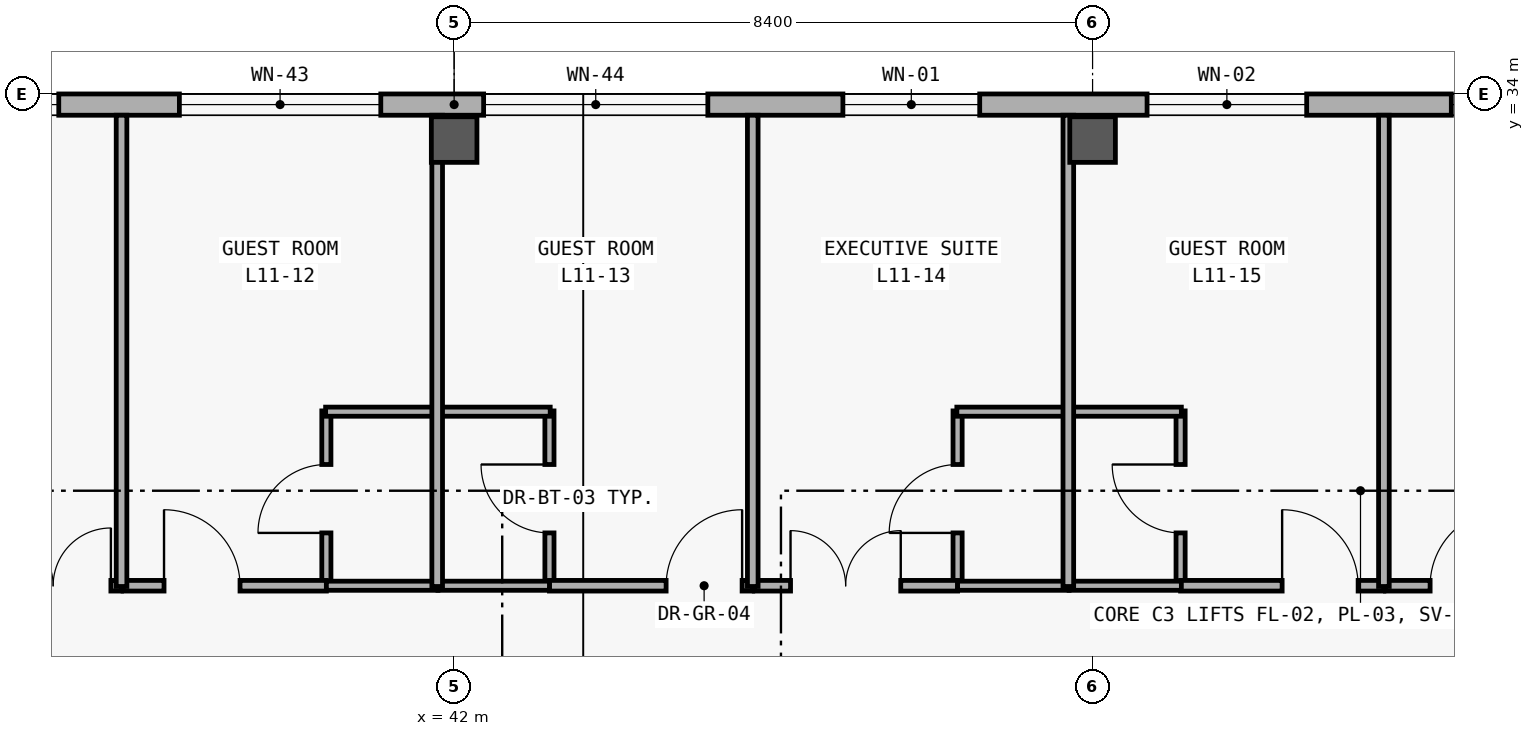
"""IFC4 building model, lengths in metres.
Left out: names, types, materials, properties, quantities, classifications, styles, units other than length and angle.
Written with IfcOpenShell. Run it as: python <this file> out.ifc"""

import sys

from ifc_helpers import new_model, si_unit, direction, frame, frame_2d, origin, origin_2d, place, context, subcontext, project, spatial, rectangle, extrude, element, fill, save


model = new_model("IFC4")
c1 = context("Model", 3, precision=1e-05, world=origin(), true_north=direction((0.0, 1.0)))
c2 = subcontext(c1, "Body", "Model", "MODEL_VIEW")
j1 = project(units=[si_unit("LENGTHUNIT", "METRE"), si_unit("PLANEANGLEUNIT", "RADIAN")], contexts=[c1])
p1 = place(None, origin())
s1 = spatial("IfcSite", under=j1, at=p1, CompositionType="ELEMENT")
p2 = place(p1, origin())
s2 = spatial("IfcBuilding", under=s1, at=p2, CompositionType="ELEMENT")
p3 = place(p2, frame((0.0, 0.0, 44.4)))
s3 = spatial("IfcBuildingStorey", under=s2, at=p3, CompositionType="ELEMENT", Elevation=44.4)
for number, where, z_axis, x_axis in (
    (1, (42.0, 33.4, 0.0), (0.0, 0.0, 1.0), (1.0, 0.0, 0.0)),
    (2, (50.4, 33.4, 0.0), (0.0, 0.0, 1.0), (1.0, 0.0, 0.0)),
):
    element("IfcColumn", number, at=place(p3, frame(where, z_axis=z_axis, x_axis=x_axis)), inside=s3, PredefinedType="COLUMN", context=c2, shape_type="SweptSolid", body=[
        extrude(rectangle(XDim=0.6, YDim=0.6, at=origin_2d()), origin(), (0.0, 0.0, 1.0), 4.2),
    ])
p4 = place(p3, frame((17.08, 33.86, 0.0), z_axis=(0.0, 0.0, 1.0), x_axis=(1.0, 0.0, 0.0)))
e3 = element("IfcWall", 3, at=p4, inside=s3, PredefinedType="SOLIDWALL", context=c2, shape_type="SweptSolid", body=[
    extrude(rectangle(XDim=49.84, YDim=0.28, at=frame_2d((24.92, 0.0))), origin(), (0.0, 0.0, 1.0), 3.96),
])
p5 = place(p4, frame((5.295, 0.0, 0.85)))
e4 = element("IfcOpeningElement", 4, at=p5, cuts=e3, PredefinedType="OPENING", context=c2, shape_type="SweptSolid", body=[
    extrude(rectangle(XDim=1.8, YDim=1.6, at=frame_2d((0.9, 0.8))), frame((0.0, 0.15, 0.0), z_axis=(0.0, -1.0, 0.0), x_axis=(1.0, 0.0, 0.0)), (0.0, 0.0, 1.0), 0.3),
])
p6 = place(p4, frame((13.136, 0.0, 0.85)))
e5 = element("IfcOpeningElement", 5, at=p6, cuts=e3, PredefinedType="OPENING", context=c2, shape_type="SweptSolid", body=[
    extrude(rectangle(XDim=2.38, YDim=1.95, at=frame_2d((1.19, 0.975))), frame((0.0, 0.15, 0.0), z_axis=(0.0, -1.0, 0.0), x_axis=(1.0, 0.0, 0.0)), (0.0, 0.0, 1.0), 0.3),
])
p7 = place(p4, frame((17.238, 0.0, 0.85)))
e6 = element("IfcOpeningElement", 6, at=p7, cuts=e3, PredefinedType="OPENING", context=c2, shape_type="SweptSolid", body=[
    extrude(rectangle(XDim=2.48, YDim=2.0, at=frame_2d((1.24, 1.0))), frame((0.0, 0.15, 0.0), z_axis=(0.0, -1.0, 0.0), x_axis=(1.0, 0.0, 0.0)), (0.0, 0.0, 1.0), 0.3),
])
p8 = place(p4, frame((21.305, 0.0, 0.85)))
e7 = element("IfcOpeningElement", 7, at=p8, cuts=e3, PredefinedType="OPENING", context=c2, shape_type="SweptSolid", body=[
    extrude(rectangle(XDim=2.65, YDim=2.0, at=frame_2d((1.325, 1.0))), frame((0.0, 0.15, 0.0), z_axis=(0.0, -1.0, 0.0), x_axis=(1.0, 0.0, 0.0)), (0.0, 0.0, 1.0), 0.3),
])
p9 = place(p4, frame((25.308, 0.0, 0.85)))
e8 = element("IfcOpeningElement", 8, at=p9, cuts=e3, PredefinedType="OPENING", context=c2, shape_type="SweptSolid", body=[
    extrude(rectangle(XDim=2.95, YDim=2.05, at=frame_2d((1.475, 1.025))), frame((0.0, 0.15, 0.0), z_axis=(0.0, -1.0, 0.0), x_axis=(1.0, 0.0, 0.0)), (0.0, 0.0, 1.0), 0.3),
])
p10 = place(p4, frame((30.035, 0.0, 0.85)))
e9 = element("IfcOpeningElement", 9, at=p10, cuts=e3, PredefinedType="OPENING", context=c2, shape_type="SweptSolid", body=[
    extrude(rectangle(XDim=1.8, YDim=1.8, at=frame_2d((0.9, 0.9))), frame((0.0, 0.15, 0.0), z_axis=(0.0, -1.0, 0.0), x_axis=(1.0, 0.0, 0.0)), (0.0, 0.0, 1.0), 0.3),
])
p11 = place(p4, frame((34.037, 0.0, 0.85)))
e10 = element("IfcOpeningElement", 10, at=p11, cuts=e3, PredefinedType="OPENING", context=c2, shape_type="SweptSolid", body=[
    extrude(rectangle(XDim=2.1, YDim=1.8, at=frame_2d((1.05, 0.9))), frame((0.0, 0.15, 0.0), z_axis=(0.0, -1.0, 0.0), x_axis=(1.0, 0.0, 0.0)), (0.0, 0.0, 1.0), 0.3),
])
p12 = place(p4, frame((38.04, 0.0, 0.85)))
e11 = element("IfcOpeningElement", 11, at=p12, cuts=e3, PredefinedType="OPENING", context=c2, shape_type="SweptSolid", body=[
    extrude(rectangle(XDim=2.4, YDim=1.8, at=frame_2d((1.2, 0.9))), frame((0.0, 0.15, 0.0), z_axis=(0.0, -1.0, 0.0), x_axis=(1.0, 0.0, 0.0)), (0.0, 0.0, 1.0), 0.3),
])
p13 = place(p4, frame((42.042, 0.0, 0.85)))
e12 = element("IfcOpeningElement", 12, at=p13, cuts=e3, PredefinedType="OPENING", context=c2, shape_type="SweptSolid", body=[
    extrude(rectangle(XDim=2.7, YDim=1.85, at=frame_2d((1.35, 0.925))), frame((0.0, 0.15, 0.0), z_axis=(0.0, -1.0, 0.0), x_axis=(1.0, 0.0, 0.0)), (0.0, 0.0, 1.0), 0.3),
])
p14 = place(p4, frame((46.044, 0.0, 0.85)))
e13 = element("IfcOpeningElement", 13, at=p14, cuts=e3, PredefinedType="OPENING", context=c2, shape_type="SweptSolid", body=[
    extrude(rectangle(XDim=3.0, YDim=1.9, at=frame_2d((1.5, 0.95))), frame((0.0, 0.15, 0.0), z_axis=(0.0, -1.0, 0.0), x_axis=(1.0, 0.0, 0.0)), (0.0, 0.0, 1.0), 0.3),
])
p15 = place(p3, frame((40.319, 27.52, 0.0), z_axis=(0.0, 0.0, 1.0), x_axis=(0.0, 1.0, 0.0)))
e14 = element("IfcWall", 14, at=p15, inside=s3, PredefinedType="PARTITIONING", context=c2, shape_type="SweptSolid", body=[
    extrude(rectangle(XDim=2.31, YDim=0.12, at=frame_2d((1.155, 0.0))), origin(), (0.0, 0.0, 1.0), 3.06),
])
p16 = place(p15, frame((0.705, 0.0, 0.0)))
e15 = element("IfcOpeningElement", 15, at=p16, cuts=e14, PredefinedType="OPENING", context=c2, shape_type="SweptSolid", body=[
    extrude(rectangle(XDim=0.9, YDim=2.18, at=frame_2d((0.45, 1.09))), frame((0.0, 0.07, 0.0), z_axis=(0.0, -1.0, 0.0), x_axis=(1.0, 0.0, 0.0)), (0.0, 0.0, 1.0), 0.14),
])
p17 = place(p3, frame((43.254, 27.52, 0.0), z_axis=(0.0, 0.0, 1.0), x_axis=(0.0, 1.0, 0.0)))
e16 = element("IfcWall", 16, at=p17, inside=s3, PredefinedType="PARTITIONING", context=c2, shape_type="SweptSolid", body=[
    extrude(rectangle(XDim=2.31, YDim=0.12, at=frame_2d((1.155, 0.0))), origin(), (0.0, 0.0, 1.0), 3.06),
])
p18 = place(p17, frame((0.705, 0.0, 0.0)))
e17 = element("IfcOpeningElement", 17, at=p18, cuts=e16, PredefinedType="OPENING", context=c2, shape_type="SweptSolid", body=[
    extrude(rectangle(XDim=0.9, YDim=2.18, at=frame_2d((0.45, 1.09))), frame((0.0, 0.07, 0.0), z_axis=(0.0, -1.0, 0.0), x_axis=(1.0, 0.0, 0.0)), (0.0, 0.0, 1.0), 0.14),
])
p19 = place(p3, frame((48.624, 27.52, 0.0), z_axis=(0.0, 0.0, 1.0), x_axis=(0.0, 1.0, 0.0)))
e18 = element("IfcWall", 18, at=p19, inside=s3, PredefinedType="PARTITIONING", context=c2, shape_type="SweptSolid", body=[
    extrude(rectangle(XDim=2.31, YDim=0.12, at=frame_2d((1.155, 0.0))), origin(), (0.0, 0.0, 1.0), 3.06),
])
p20 = place(p19, frame((0.705, 0.0, 0.0)))
e19 = element("IfcOpeningElement", 19, at=p20, cuts=e18, PredefinedType="OPENING", context=c2, shape_type="SweptSolid", body=[
    extrude(rectangle(XDim=0.9, YDim=2.18, at=frame_2d((0.45, 1.09))), frame((0.0, 0.07, 0.0), z_axis=(0.0, -1.0, 0.0), x_axis=(1.0, 0.0, 0.0)), (0.0, 0.0, 1.0), 0.14),
])
p21 = place(p3, frame((51.558, 27.52, 0.0), z_axis=(0.0, 0.0, 1.0), x_axis=(0.0, 1.0, 0.0)))
e20 = element("IfcWall", 20, at=p21, inside=s3, PredefinedType="PARTITIONING", context=c2, shape_type="SweptSolid", body=[
    extrude(rectangle(XDim=2.31, YDim=0.12, at=frame_2d((1.155, 0.0))), origin(), (0.0, 0.0, 1.0), 3.06),
])
p22 = place(p21, frame((0.705, 0.0, 0.0)))
e21 = element("IfcOpeningElement", 21, at=p22, cuts=e20, PredefinedType="OPENING", context=c2, shape_type="SweptSolid", body=[
    extrude(rectangle(XDim=0.9, YDim=2.18, at=frame_2d((0.45, 1.09))), frame((0.0, 0.07, 0.0), z_axis=(0.0, -1.0, 0.0), x_axis=(1.0, 0.0, 0.0)), (0.0, 0.0, 1.0), 0.14),
])
p23 = place(p3, frame((34.949, 27.53, 0.0), z_axis=(0.0, 0.0, 1.0), x_axis=(1.0, 0.0, 0.0)))
e22 = element("IfcWall", 22, at=p23, inside=s3, PredefinedType="PARTITIONING", context=c2, shape_type="SweptSolid", body=[
    extrude(rectangle(XDim=2.675, YDim=0.14, at=frame_2d((1.337, 0.0))), origin(), (0.0, 0.0, 1.0), 3.06),
])
p24 = place(p23, frame((1.015, 0.0, 0.0)))
e23 = element("IfcOpeningElement", 23, at=p24, cuts=e22, PredefinedType="OPENING", context=c2, shape_type="SweptSolid", body=[
    extrude(rectangle(XDim=1.52, YDim=2.35, at=frame_2d((0.76, 1.175))), frame((0.0, 0.08, 0.0), z_axis=(0.0, -1.0, 0.0), x_axis=(1.0, 0.0, 0.0)), (0.0, 0.0, 1.0), 0.16),
])
p25 = place(p3, frame((37.644, 27.53, 0.0), z_axis=(0.0, 0.0, 1.0), x_axis=(1.0, 0.0, 0.0)))
e24 = element("IfcWall", 24, at=p25, inside=s3, PredefinedType="PARTITIONING", context=c2, shape_type="SweptSolid", body=[
    extrude(rectangle(XDim=2.675, YDim=0.14, at=frame_2d((1.337, 0.0))), origin(), (0.0, 0.0, 1.0), 3.06),
])
p26 = place(p25, frame((0.539, 0.0, 0.0)))
e25 = element("IfcOpeningElement", 25, at=p26, cuts=e24, PredefinedType="OPENING", context=c2, shape_type="SweptSolid", body=[
    extrude(rectangle(XDim=1.0, YDim=2.28, at=frame_2d((0.5, 1.14))), frame((0.0, 0.08, 0.0), z_axis=(0.0, -1.0, 0.0), x_axis=(1.0, 0.0, 0.0)), (0.0, 0.0, 1.0), 0.16),
])
p27 = place(p3, frame((43.254, 27.53, 0.0), z_axis=(0.0, 0.0, 1.0), x_axis=(1.0, 0.0, 0.0)))
e26 = element("IfcWall", 26, at=p27, inside=s3, PredefinedType="PARTITIONING", context=c2, shape_type="SweptSolid", body=[
    extrude(rectangle(XDim=2.675, YDim=0.14, at=frame_2d((1.337, 0.0))), origin(), (0.0, 0.0, 1.0), 3.06),
])
p28 = place(p27, frame((1.535, 0.0, 0.0)))
e27 = element("IfcOpeningElement", 27, at=p28, cuts=e26, PredefinedType="OPENING", context=c2, shape_type="SweptSolid", body=[
    extrude(rectangle(XDim=1.0, YDim=2.28, at=frame_2d((0.5, 1.14))), frame((0.0, 0.08, 0.0), z_axis=(0.0, -1.0, 0.0), x_axis=(1.0, 0.0, 0.0)), (0.0, 0.0, 1.0), 0.16),
])
p29 = place(p3, frame((45.949, 27.53, 0.0), z_axis=(0.0, 0.0, 1.0), x_axis=(1.0, 0.0, 0.0)))
e28 = element("IfcWall", 28, at=p29, inside=s3, PredefinedType="PARTITIONING", context=c2, shape_type="SweptSolid", body=[
    extrude(rectangle(XDim=2.675, YDim=0.14, at=frame_2d((1.337, 0.0))), origin(), (0.0, 0.0, 1.0), 3.06),
])
p30 = place(p29, frame((0.477, 0.0, 0.0)))
e29 = element("IfcOpeningElement", 29, at=p30, cuts=e28, PredefinedType="OPENING", context=c2, shape_type="SweptSolid", body=[
    extrude(rectangle(XDim=1.45, YDim=2.3, at=frame_2d((0.725, 1.15))), frame((0.0, 0.08, 0.0), z_axis=(0.0, -1.0, 0.0), x_axis=(1.0, 0.0, 0.0)), (0.0, 0.0, 1.0), 0.16),
])
p31 = place(p3, frame((51.558, 27.53, 0.0), z_axis=(0.0, 0.0, 1.0), x_axis=(1.0, 0.0, 0.0)))
e30 = element("IfcWall", 30, at=p31, inside=s3, PredefinedType="PARTITIONING", context=c2, shape_type="SweptSolid", body=[
    extrude(rectangle(XDim=2.675, YDim=0.14, at=frame_2d((1.337, 0.0))), origin(), (0.0, 0.0, 1.0), 3.06),
])
p32 = place(p31, frame((1.336, 0.0, 0.0)))
e31 = element("IfcOpeningElement", 31, at=p32, cuts=e30, PredefinedType="OPENING", context=c2, shape_type="SweptSolid", body=[
    extrude(rectangle(XDim=1.0, YDim=2.28, at=frame_2d((0.5, 1.14))), frame((0.0, 0.08, 0.0), z_axis=(0.0, -1.0, 0.0), x_axis=(1.0, 0.0, 0.0)), (0.0, 0.0, 1.0), 0.16),
])
p33 = place(p3, frame((54.253, 27.53, 0.0), z_axis=(0.0, 0.0, 1.0), x_axis=(1.0, 0.0, 0.0)))
e32 = element("IfcWall", 32, at=p33, inside=s3, PredefinedType="PARTITIONING", context=c2, shape_type="SweptSolid", body=[
    extrude(rectangle(XDim=2.675, YDim=0.14, at=frame_2d((1.337, 0.0))), origin(), (0.0, 0.0, 1.0), 3.06),
])
p34 = place(p33, frame((0.588, 0.0, 0.0)))
e33 = element("IfcOpeningElement", 33, at=p34, cuts=e32, PredefinedType="OPENING", context=c2, shape_type="SweptSolid", body=[
    extrude(rectangle(XDim=1.0, YDim=2.28, at=frame_2d((0.5, 1.14))), frame((0.0, 0.08, 0.0), z_axis=(0.0, -1.0, 0.0), x_axis=(1.0, 0.0, 0.0)), (0.0, 0.0, 1.0), 0.16),
])
p35 = place(p3, frame((40.319, 27.53, 0.0), z_axis=(0.0, 0.0, 1.0), x_axis=(1.0, 0.0, 0.0)))
e34 = element("IfcWall", 34, at=p35, inside=s3, PredefinedType="PARTITIONING", context=c2, shape_type="SweptSolid", body=[
    extrude(rectangle(XDim=1.468, YDim=0.12, at=frame_2d((0.734, 0.0))), origin(), (0.0, 0.0, 1.0), 3.06),
])
p36 = place(p3, frame((40.309, 29.82, 0.0), z_axis=(0.0, 0.0, 1.0), x_axis=(1.0, 0.0, 0.0)))
e35 = element("IfcWall", 35, at=p36, inside=s3, PredefinedType="PARTITIONING", context=c2, shape_type="SweptSolid", body=[
    extrude(rectangle(XDim=1.478, YDim=0.12, at=frame_2d((0.739, 0.0))), origin(), (0.0, 0.0, 1.0), 3.06),
])
p37 = place(p3, frame((41.787, 27.53, 0.0), z_axis=(0.0, 0.0, 1.0), x_axis=(1.0, 0.0, 0.0)))
e36 = element("IfcWall", 36, at=p37, inside=s3, PredefinedType="PARTITIONING", context=c2, shape_type="SweptSolid", body=[
    extrude(rectangle(XDim=1.467, YDim=0.12, at=frame_2d((0.733, 0.0))), origin(), (0.0, 0.0, 1.0), 3.06),
])
p38 = place(p3, frame((41.787, 29.82, 0.0), z_axis=(0.0, 0.0, 1.0), x_axis=(1.0, 0.0, 0.0)))
e37 = element("IfcWall", 37, at=p38, inside=s3, PredefinedType="PARTITIONING", context=c2, shape_type="SweptSolid", body=[
    extrude(rectangle(XDim=1.477, YDim=0.12, at=frame_2d((0.738, 0.0))), origin(), (0.0, 0.0, 1.0), 3.06),
])
p39 = place(p3, frame((48.624, 27.53, 0.0), z_axis=(0.0, 0.0, 1.0), x_axis=(1.0, 0.0, 0.0)))
e38 = element("IfcWall", 38, at=p39, inside=s3, PredefinedType="PARTITIONING", context=c2, shape_type="SweptSolid", body=[
    extrude(rectangle(XDim=1.467, YDim=0.12, at=frame_2d((0.733, 0.0))), origin(), (0.0, 0.0, 1.0), 3.06),
])
for number, where, z_axis, x_axis in (
    (39, (48.614, 29.82, 0.0), (0.0, 0.0, 1.0), (1.0, 0.0, 0.0)),
    (40, (50.091, 27.53, 0.0), (0.0, 0.0, 1.0), (1.0, 0.0, 0.0)),
    (41, (50.091, 29.82, 0.0), (0.0, 0.0, 1.0), (1.0, 0.0, 0.0)),
):
    element("IfcWall", number, at=place(p3, frame(where, z_axis=z_axis, x_axis=x_axis)), inside=s3, PredefinedType="PARTITIONING", context=c2, shape_type="SweptSolid", body=[
        extrude(rectangle(XDim=1.477, YDim=0.12, at=frame_2d((0.739, 0.0))), origin(), (0.0, 0.0, 1.0), 3.06),
    ])
for number, where, z_axis, x_axis in (
    (42, (37.624, 27.52, 0.0), (0.0, 0.0, 1.0), (0.0, 1.0, 0.0)),
    (43, (41.777, 27.52, 0.0), (0.0, 0.0, 1.0), (0.0, 1.0, 0.0)),
    (44, (45.929, 27.52, 0.0), (0.0, 0.0, 1.0), (0.0, 1.0, 0.0)),
    (45, (50.081, 27.52, 0.0), (0.0, 0.0, 1.0), (0.0, 1.0, 0.0)),
    (46, (54.233, 27.52, 0.0), (0.0, 0.0, 1.0), (0.0, 1.0, 0.0)),
):
    element("IfcWall", number, at=place(p3, frame(where, z_axis=z_axis, x_axis=x_axis)), inside=s3, PredefinedType="PARTITIONING", context=c2, shape_type="SweptSolid", body=[
        extrude(rectangle(XDim=6.2, YDim=0.14, at=frame_2d((3.1, 0.0))), origin(), (0.0, 0.0, 1.0), 3.06),
    ])
p40 = place(p7, origin())
e47 = element("IfcWindow", 47, at=p40, inside=s3, PartitioningType="SINGLE_PANEL", PredefinedType="WINDOW", context=c2, shape_type="SweptSolid", body=[
    extrude(rectangle(XDim=2.48, YDim=2.0, at=frame_2d((1.24, 1.0))), frame((0.0, 0.03, 0.0), z_axis=(0.0, -1.0, 0.0), x_axis=(1.0, 0.0, 0.0)), (0.0, 0.0, 1.0), 0.06),
])
fill(e6, e47)
p41 = place(p8, origin())
e48 = element("IfcWindow", 48, at=p41, inside=s3, PartitioningType="SINGLE_PANEL", PredefinedType="WINDOW", context=c2, shape_type="SweptSolid", body=[
    extrude(rectangle(XDim=2.65, YDim=2.0, at=frame_2d((1.325, 1.0))), frame((0.0, 0.03, 0.0), z_axis=(0.0, -1.0, 0.0), x_axis=(1.0, 0.0, 0.0)), (0.0, 0.0, 1.0), 0.06),
])
fill(e7, e48)
p42 = place(p9, origin())
e49 = element("IfcWindow", 49, at=p42, inside=s3, PartitioningType="SINGLE_PANEL", PredefinedType="WINDOW", context=c2, shape_type="SweptSolid", body=[
    extrude(rectangle(XDim=2.95, YDim=2.05, at=frame_2d((1.475, 1.025))), frame((0.0, 0.03, 0.0), z_axis=(0.0, -1.0, 0.0), x_axis=(1.0, 0.0, 0.0)), (0.0, 0.0, 1.0), 0.06),
])
fill(e8, e49)
p43 = place(p10, origin())
e50 = element("IfcWindow", 50, at=p43, inside=s3, PartitioningType="SINGLE_PANEL", PredefinedType="WINDOW", context=c2, shape_type="SweptSolid", body=[
    extrude(rectangle(XDim=1.8, YDim=1.8, at=frame_2d((0.9, 0.9))), frame((0.0, 0.03, 0.0), z_axis=(0.0, -1.0, 0.0), x_axis=(1.0, 0.0, 0.0)), (0.0, 0.0, 1.0), 0.06),
])
fill(e9, e50)
p44 = place(p11, origin())
e51 = element("IfcWindow", 51, at=p44, inside=s3, PartitioningType="SINGLE_PANEL", PredefinedType="WINDOW", context=c2, shape_type="SweptSolid", body=[
    extrude(rectangle(XDim=2.1, YDim=1.8, at=frame_2d((1.05, 0.9))), frame((0.0, 0.03, 0.0), z_axis=(0.0, -1.0, 0.0), x_axis=(1.0, 0.0, 0.0)), (0.0, 0.0, 1.0), 0.06),
])
fill(e10, e51)
p45 = place(p12, origin())
e52 = element("IfcWindow", 52, at=p45, inside=s3, PartitioningType="SINGLE_PANEL", PredefinedType="WINDOW", context=c2, shape_type="SweptSolid", body=[
    extrude(rectangle(XDim=2.4, YDim=1.8, at=frame_2d((1.2, 0.9))), frame((0.0, 0.03, 0.0), z_axis=(0.0, -1.0, 0.0), x_axis=(1.0, 0.0, 0.0)), (0.0, 0.0, 1.0), 0.06),
])
fill(e11, e52)
p46 = place(p16, origin())
e53 = element("IfcDoor", 53, at=p46, inside=s3, OperationType="SINGLE_SWING_LEFT", PredefinedType="DOOR", context=c2, shape_type="SweptSolid", body=[
    extrude(rectangle(XDim=0.9, YDim=2.18, at=frame_2d((0.45, 1.09))), frame((0.0, 0.025, 0.0), z_axis=(0.0, -1.0, 0.0), x_axis=(1.0, 0.0, 0.0)), (0.0, 0.0, 1.0), 0.05),
])
fill(e15, e53)
p47 = place(p18, origin())
e54 = element("IfcDoor", 54, at=p47, inside=s3, OperationType="SINGLE_SWING_RIGHT", PredefinedType="DOOR", context=c2, shape_type="SweptSolid", body=[
    extrude(rectangle(XDim=0.9, YDim=2.18, at=frame_2d((0.45, 1.09))), frame((0.0, 0.025, 0.0), z_axis=(0.0, -1.0, 0.0), x_axis=(1.0, 0.0, 0.0)), (0.0, 0.0, 1.0), 0.05),
])
fill(e17, e54)
p48 = place(p20, origin())
e55 = element("IfcDoor", 55, at=p48, inside=s3, OperationType="SINGLE_SWING_LEFT", PredefinedType="DOOR", context=c2, shape_type="SweptSolid", body=[
    extrude(rectangle(XDim=0.9, YDim=2.18, at=frame_2d((0.45, 1.09))), frame((0.0, 0.025, 0.0), z_axis=(0.0, -1.0, 0.0), x_axis=(1.0, 0.0, 0.0)), (0.0, 0.0, 1.0), 0.05),
])
fill(e19, e55)
p49 = place(p22, origin())
e56 = element("IfcDoor", 56, at=p49, inside=s3, OperationType="SINGLE_SWING_RIGHT", PredefinedType="DOOR", context=c2, shape_type="SweptSolid", body=[
    extrude(rectangle(XDim=0.9, YDim=2.18, at=frame_2d((0.45, 1.09))), frame((0.0, 0.025, 0.0), z_axis=(0.0, -1.0, 0.0), x_axis=(1.0, 0.0, 0.0)), (0.0, 0.0, 1.0), 0.05),
])
fill(e21, e56)
p50 = place(p24, origin())
e57 = element("IfcDoor", 57, at=p50, inside=s3, OperationType="DOUBLE_DOOR_SINGLE_SWING", PredefinedType="DOOR", context=c2, shape_type="SweptSolid", body=[
    extrude(rectangle(XDim=1.52, YDim=2.35, at=frame_2d((0.76, 1.175))), frame((0.0, 0.025, 0.0), z_axis=(0.0, -1.0, 0.0), x_axis=(1.0, 0.0, 0.0)), (0.0, 0.0, 1.0), 0.05),
])
fill(e23, e57)
p51 = place(p26, origin())
e58 = element("IfcDoor", 58, at=p51, inside=s3, OperationType="SINGLE_SWING_LEFT", PredefinedType="DOOR", context=c2, shape_type="SweptSolid", body=[
    extrude(rectangle(XDim=1.0, YDim=2.28, at=frame_2d((0.5, 1.14))), frame((0.0, 0.025, 0.0), z_axis=(0.0, -1.0, 0.0), x_axis=(1.0, 0.0, 0.0)), (0.0, 0.0, 1.0), 0.05),
])
fill(e25, e58)
p52 = place(p28, origin())
e59 = element("IfcDoor", 59, at=p52, inside=s3, OperationType="SINGLE_SWING_RIGHT", PredefinedType="DOOR", context=c2, shape_type="SweptSolid", body=[
    extrude(rectangle(XDim=1.0, YDim=2.28, at=frame_2d((0.5, 1.14))), frame((0.0, 0.025, 0.0), z_axis=(0.0, -1.0, 0.0), x_axis=(1.0, 0.0, 0.0)), (0.0, 0.0, 1.0), 0.05),
])
fill(e27, e59)
p53 = place(p30, origin())
e60 = element("IfcDoor", 60, at=p53, inside=s3, OperationType="DOUBLE_DOOR_SINGLE_SWING", PredefinedType="DOOR", context=c2, shape_type="SweptSolid", body=[
    extrude(rectangle(XDim=1.45, YDim=2.3, at=frame_2d((0.725, 1.15))), frame((0.0, 0.025, 0.0), z_axis=(0.0, -1.0, 0.0), x_axis=(1.0, 0.0, 0.0)), (0.0, 0.0, 1.0), 0.05),
])
fill(e29, e60)
p54 = place(p32, origin())
e61 = element("IfcDoor", 61, at=p54, inside=s3, OperationType="SINGLE_SWING_LEFT", PredefinedType="DOOR", context=c2, shape_type="SweptSolid", body=[
    extrude(rectangle(XDim=1.0, YDim=2.28, at=frame_2d((0.5, 1.14))), frame((0.0, 0.025, 0.0), z_axis=(0.0, -1.0, 0.0), x_axis=(1.0, 0.0, 0.0)), (0.0, 0.0, 1.0), 0.05),
])
fill(e31, e61)
p55 = place(p34, origin())
e62 = element("IfcDoor", 62, at=p55, inside=s3, OperationType="SINGLE_SWING_RIGHT", PredefinedType="DOOR", context=c2, shape_type="SweptSolid", body=[
    extrude(rectangle(XDim=1.0, YDim=2.28, at=frame_2d((0.5, 1.14))), frame((0.0, 0.025, 0.0), z_axis=(0.0, -1.0, 0.0), x_axis=(1.0, 0.0, 0.0)), (0.0, 0.0, 1.0), 0.05),
])
fill(e33, e62)
save(model, sys.argv[1])
